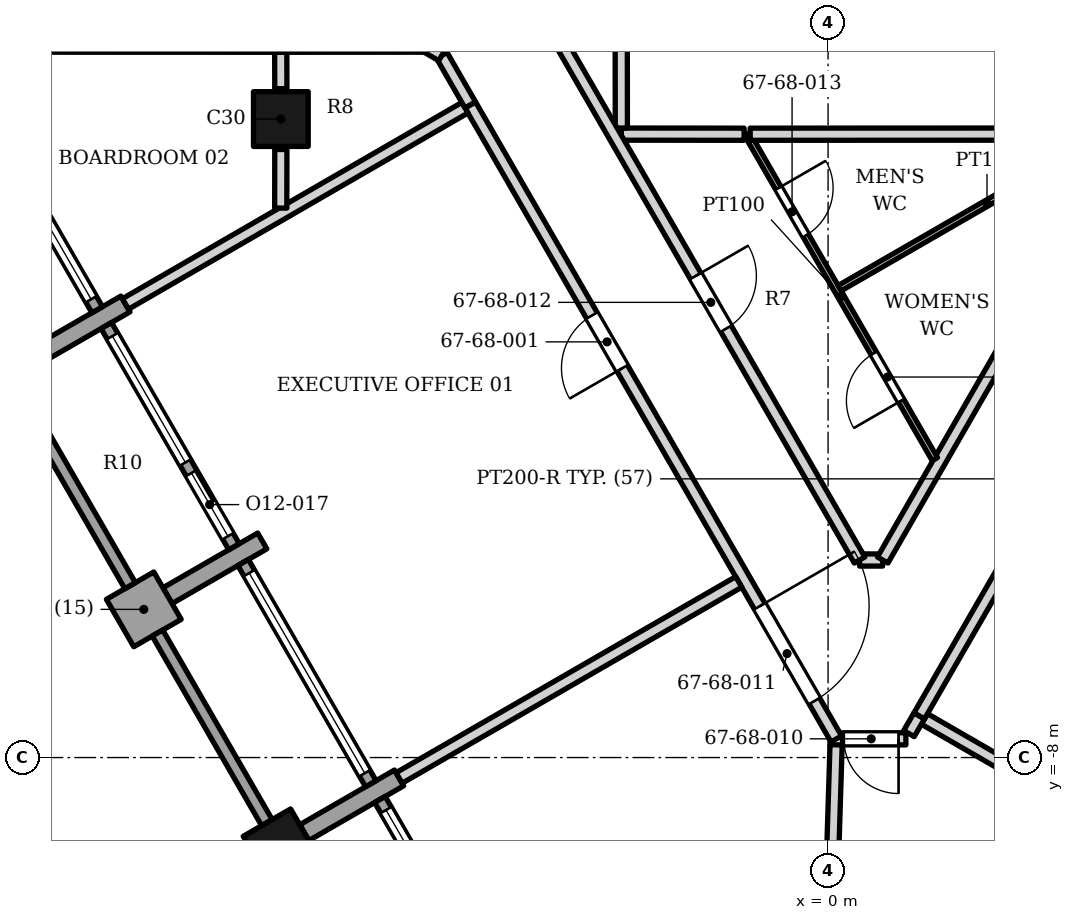
"""IFC4 building model, lengths in metres.
Left out: names, types, materials, properties, quantities, classifications, styles, units other than length and angle.
Written with IfcOpenShell. Run it as: python <this file> out.ifc"""

import sys

from ifc_helpers import new_model, si_unit, direction, frame, frame_2d, origin, origin_2d, place, context, subcontext, project, spatial, rectangle, extrude, element, fill, save


model = new_model("IFC4")
c1 = context("Model", 3, precision=1e-05, world=origin(), true_north=direction((0.0, 1.0)))
c2 = subcontext(c1, "Body", "Model", "MODEL_VIEW")
j1 = project(units=[si_unit("LENGTHUNIT", "METRE"), si_unit("PLANEANGLEUNIT", "RADIAN")], contexts=[c1])
p1 = place(None, origin())
s1 = spatial("IfcSite", under=j1, at=p1, CompositionType="ELEMENT")
p2 = place(p1, origin())
s2 = spatial("IfcBuilding", under=s1, at=p2, CompositionType="ELEMENT")
p3 = place(p2, frame((0.0, 0.0, 279.4)))
s3 = spatial("IfcBuildingStorey", under=s2, at=p3, CompositionType="ELEMENT", Elevation=279.4)
for number, where, z_axis, x_axis in (
    (1, (-9.0, 2.5, 0.0), (0.0, 0.0, 1.0), (1.0, 0.0, 0.0)),
    (2, (-9.004, -9.46, 0.0), (0.0, 0.0, 1.0), (0.5, -0.866, 0.0)),
):
    element("IfcColumn", number, at=place(p3, frame(where, z_axis=z_axis, x_axis=x_axis)), inside=s3, PredefinedType="COLUMN", context=c2, shape_type="SweptSolid", body=[
        extrude(rectangle(XDim=0.9, YDim=0.9, at=origin_2d()), origin(), (0.0, 0.0, 1.0), 3.9),
    ])
p4 = place(p3, frame((-11.555, -0.541, 0.0), z_axis=(0.0, 0.0, 1.0), x_axis=(-0.866047807691, -0.499961193289, 0.0)))
e3 = element("IfcWall", 3, at=p4, inside=s3, PredefinedType="SOLIDWALL", context=c2, shape_type="SweptSolid", body=[
    extrude(rectangle(XDim=1.8, YDim=0.3, at=frame_2d((0.9, 0.0))), origin(), (0.0, 0.0, 1.0), 3.0),
])
p5 = place(p3, frame((-11.479, -5.173, 0.0), z_axis=(0.0, 0.0, 1.0), x_axis=(0.499902469156, -0.866081705922, 0.0)))
e4 = element("IfcWall", 4, at=p5, inside=s3, PredefinedType="SOLIDWALL", context=c2, shape_type="SweptSolid", body=[
    extrude(rectangle(XDim=0.9, YDim=0.9, at=frame_2d((0.45, 0.0))), origin(), (0.0, 0.0, 1.0), 3.0),
])
for number, where, z_axis, x_axis in (
    (5, (-9.305, -4.438, 0.0), (0.0, 0.0, 1.0), (-0.866, -0.5, 0.0)),
    (6, (-8.614, -9.235, 0.0), (0.0, 0.0, 1.0), (0.866, 0.5, 0.0)),
):
    element("IfcWall", number, at=place(p3, frame(where, z_axis=z_axis, x_axis=x_axis)), inside=s3, PredefinedType="SOLIDWALL", context=c2, shape_type="SweptSolid", body=[
        extrude(rectangle(XDim=1.8, YDim=0.3, at=frame_2d((0.9, 0.0))), origin(), (0.0, 0.0, 1.0), 3.0),
    ])
p6 = place(p3, frame((-14.12, 3.001, 0.0), z_axis=(0.0, 0.0, 1.0), x_axis=(0.49998411664, -0.866034573852, 0.0)))
e7 = element("IfcWall", 7, at=p6, inside=s3, PredefinedType="ELEMENTEDWALL", context=c2, shape_type="SweptSolid", body=[
    extrude(rectangle(XDim=4.2, YDim=0.2, at=frame_2d((2.1, 0.0))), origin(), (0.0, 0.0, 1.0), 3.0),
])
p7 = place(p6, frame((0.2, 0.0, 0.45)))
e8 = element("IfcOpeningElement", 8, at=p7, cuts=e7, PredefinedType="OPENING", context=c2, shape_type="SweptSolid", body=[
    extrude(rectangle(XDim=3.8, YDim=2.25, at=frame_2d((1.9, 1.125))), frame((0.0, 0.11, 0.0), z_axis=(0.0, -1.0, 0.0), x_axis=(1.0, 0.0, 0.0)), (0.0, 0.0, 1.0), 0.22),
])
p8 = place(p3, frame((-13.279, -2.056, 0.0), z_axis=(0.0, 0.0, 1.0), x_axis=(0.500012057535, -0.866018442252, 0.0)))
e9 = element("IfcWall", 9, at=p8, inside=s3, PredefinedType="SOLIDWALL", context=c2, shape_type="SweptSolid", body=[
    extrude(rectangle(XDim=3.6, YDim=0.2, at=frame_2d((1.8, 0.0))), origin(), (0.0, 0.0, 1.0), 3.0),
])
p9 = place(p3, frame((-11.87, -0.896, 0.0), z_axis=(0.0, 0.0, 1.0), x_axis=(0.499958946799, -0.866049104564, 0.0)))
e10 = element("IfcWall", 10, at=p9, inside=s3, PredefinedType="ELEMENTEDWALL", context=c2, shape_type="SweptSolid", body=[
    extrude(rectangle(XDim=4.2, YDim=0.2, at=frame_2d((2.1, 0.0))), origin(), (0.0, 0.0, 1.0), 3.0),
])
p10 = place(p9, frame((0.2, 0.0, 0.45)))
e11 = element("IfcOpeningElement", 11, at=p10, cuts=e10, PredefinedType="OPENING", context=c2, shape_type="SweptSolid", body=[
    extrude(rectangle(XDim=2.4, YDim=2.25, at=frame_2d((1.2, 1.125))), frame((0.0, 0.11, 0.0), z_axis=(0.0, -1.0, 0.0), x_axis=(1.0, 0.0, 0.0)), (0.0, 0.0, 1.0), 0.22),
])
p11 = place(p9, frame((2.8, 0.0, 0.0)))
e12 = element("IfcOpeningElement", 12, at=p11, cuts=e10, PredefinedType="OPENING", context=c2, shape_type="SweptSolid", body=[
    extrude(rectangle(XDim=1.2, YDim=2.7, at=frame_2d((0.6, 1.35))), frame((0.0, 0.11, 0.0), z_axis=(0.0, -1.0, 0.0), x_axis=(1.0, 0.0, 0.0)), (0.0, 0.0, 1.0), 0.22),
])
p12 = place(p3, frame((-11.029, -5.953, 0.0), z_axis=(0.0, 0.0, 1.0), x_axis=(0.500012057535, -0.866018442252, 0.0)))
e13 = element("IfcWall", 13, at=p12, inside=s3, PredefinedType="SOLIDWALL", context=c2, shape_type="SweptSolid", body=[
    extrude(rectangle(XDim=3.6, YDim=0.2, at=frame_2d((1.8, 0.0))), origin(), (0.0, 0.0, 1.0), 3.0),
])
p13 = place(p3, frame((-9.62, -4.793, 0.0), z_axis=(0.0, 0.0, 1.0), x_axis=(0.49998411664, -0.866034573852, 0.0)))
e14 = element("IfcWall", 14, at=p13, inside=s3, PredefinedType="ELEMENTEDWALL", context=c2, shape_type="SweptSolid", body=[
    extrude(rectangle(XDim=4.2, YDim=0.2, at=frame_2d((2.1, 0.0))), origin(), (0.0, 0.0, 1.0), 3.0),
])
p14 = place(p13, frame((0.2, 0.0, 0.45)))
e15 = element("IfcOpeningElement", 15, at=p14, cuts=e14, PredefinedType="OPENING", context=c2, shape_type="SweptSolid", body=[
    extrude(rectangle(XDim=3.8, YDim=2.25, at=frame_2d((1.9, 1.125))), frame((0.0, 0.11, 0.0), z_axis=(0.0, -1.0, 0.0), x_axis=(1.0, 0.0, 0.0)), (0.0, 0.0, 1.0), 0.22),
])
p15 = place(p3, frame((-7.37, -8.69, 0.0), z_axis=(0.0, 0.0, 1.0), x_axis=(0.49998411664, -0.866034573852, 0.0)))
e16 = element("IfcWall", 16, at=p15, inside=s3, PredefinedType="ELEMENTEDWALL", context=c2, shape_type="SweptSolid", body=[
    extrude(rectangle(XDim=4.2, YDim=0.2, at=frame_2d((2.1, 0.0))), origin(), (0.0, 0.0, 1.0), 2.95),
])
p16 = place(p15, frame((0.2, 0.0, 0.45)))
e17 = element("IfcOpeningElement", 17, at=p16, cuts=e16, PredefinedType="OPENING", context=c2, shape_type="SweptSolid", body=[
    extrude(rectangle(XDim=2.4, YDim=2.25, at=frame_2d((1.2, 1.125))), frame((0.0, 0.11, 0.0), z_axis=(0.0, -1.0, 0.0), x_axis=(1.0, 0.0, 0.0)), (0.0, 0.0, 1.0), 0.22),
])
p17 = place(p15, frame((2.8, 0.0, 0.0)))
e18 = element("IfcOpeningElement", 18, at=p17, cuts=e16, PredefinedType="OPENING", context=c2, shape_type="SweptSolid", body=[
    extrude(rectangle(XDim=1.2, YDim=2.7, at=frame_2d((0.6, 1.35))), frame((0.0, 0.11, 0.0), z_axis=(0.0, -1.0, 0.0), x_axis=(1.0, 0.0, 0.0)), (0.0, 0.0, 1.0), 0.22),
])
p18 = place(p3, frame((0.016, -11.5, 0.0), z_axis=(0.0, 0.0, 1.0), x_axis=(0.031312793596, 0.999509634249, 0.0)))
e19 = element("IfcWall", 19, at=p18, inside=s3, PredefinedType="PARTITIONING", context=c2, shape_type="SweptSolid", body=[
    extrude(rectangle(XDim=3.711, YDim=0.2, at=frame_2d((1.855, 0.0))), origin(), (0.0, 0.0, 1.0), 2.884),
])
p19 = place(p3, frame((1.584, -7.365, 0.0), z_axis=(0.0, 0.0, 1.0), x_axis=(0.866145880339, -0.499791270404, 0.0)))
e20 = element("IfcWall", 20, at=p19, inside=s3, PredefinedType="PARTITIONING", context=c2, shape_type="SweptSolid", body=[
    extrude(rectangle(XDim=6.449, YDim=0.2, at=frame_2d((3.225, 0.0))), origin(), (0.0, 0.0, 1.0), 2.884),
])
p20 = place(p3, frame((-5.885, 2.733, 0.0), z_axis=(0.0, 0.0, 1.0), x_axis=(0.499999199346, -0.866025866042, 0.0)))
e21 = element("IfcWall", 21, at=p20, inside=s3, PredefinedType="PARTITIONING", context=c2, shape_type="SweptSolid", body=[
    extrude(rectangle(XDim=12.04, YDim=0.2, at=frame_2d((6.02, 0.0))), origin(), (0.0, 0.0, 1.0), 2.884),
])
p21 = place(p20, frame((4.0, 0.0, 0.0)))
e22 = element("IfcOpeningElement", 22, at=p21, cuts=e21, PredefinedType="OPENING", context=c2, shape_type="SweptSolid", body=[
    extrude(rectangle(XDim=1.0, YDim=2.4, at=frame_2d((0.5, 1.2))), frame((0.0, 0.11, 0.0), z_axis=(0.0, -1.0, 0.0), x_axis=(1.0, 0.0, 0.0)), (0.0, 0.0, 1.0), 0.22),
])
p22 = place(p20, frame((9.52, 0.0, 0.0)))
e23 = element("IfcOpeningElement", 23, at=p22, cuts=e21, PredefinedType="OPENING", context=c2, shape_type="SweptSolid", body=[
    extrude(rectangle(XDim=1.8, YDim=2.4, at=frame_2d((0.9, 1.2))), frame((0.0, 0.11, 0.0), z_axis=(0.0, -1.0, 0.0), x_axis=(1.0, 0.0, 0.0)), (0.0, 0.0, 1.0), 0.22),
])
p23 = place(p3, frame((0.236, -7.692, 0.0), z_axis=(0.0, 0.0, 1.0), x_axis=(1.0, 0.0, 0.0)))
e24 = element("IfcWall", 24, at=p23, inside=s3, PredefinedType="PARTITIONING", context=c2, shape_type="SweptSolid", body=[
    extrude(rectangle(XDim=1.043, YDim=0.2, at=frame_2d((0.522, 0.0))), origin(), (0.0, 0.0, 1.0), 3.73),
])
p24 = place(p23, frame((0.023, 0.0, 0.0)))
e25 = element("IfcOpeningElement", 25, at=p24, cuts=e24, PredefinedType="OPENING", context=c2, shape_type="SweptSolid", body=[
    extrude(rectangle(XDim=0.9, YDim=2.1, at=frame_2d((0.45, 1.05))), frame((0.0, 0.11, 0.0), z_axis=(0.0, -1.0, 0.0), x_axis=(1.0, 0.0, 0.0)), (0.0, 0.0, 1.0), 0.22),
])
p25 = place(p3, frame((1.33, -7.606, 0.0), z_axis=(0.0, 0.0, 1.0), x_axis=(0.503375579216, 0.86406772087, 0.0)))
e26 = element("IfcWall", 26, at=p25, inside=s3, PredefinedType="PARTITIONING", context=c2, shape_type="SweptSolid", body=[
    extrude(rectangle(XDim=0.337, YDim=0.2, at=frame_2d((0.168, 0.0))), origin(), (0.0, 0.0, 1.0), 3.73),
])
p26 = place(p3, frame((-7.055, -8.336, 0.0), z_axis=(0.0, 0.0, 1.0), x_axis=(0.866129493323, 0.499819668277, 0.0)))
e27 = element("IfcWall", 27, at=p26, inside=s3, PredefinedType="PARTITIONING", context=c2, shape_type="SweptSolid", body=[
    extrude(rectangle(XDim=6.45, YDim=0.2, at=frame_2d((3.225, 0.0))), origin(), (0.0, 0.0, 1.0), 2.884),
])
p27 = place(p3, frame((0.517, -4.751, 0.0), z_axis=(0.0, 0.0, 1.0), x_axis=(1.0, 0.0, 0.0)))
e28 = element("IfcWall", 28, at=p27, inside=s3, PredefinedType="PARTITIONING", context=c2, shape_type="SweptSolid", body=[
    extrude(rectangle(XDim=0.381, YDim=0.2, at=frame_2d((0.19, 0.0))), origin(), (0.0, 0.0, 1.0), 3.73),
])
p28 = place(p3, frame((0.898, -4.751, 0.0), z_axis=(0.0, 0.0, 1.0), x_axis=(0.499141293918, 0.866520610664, 0.0)))
e29 = element("IfcWall", 29, at=p28, inside=s3, PredefinedType="PARTITIONING", context=c2, shape_type="SweptSolid", body=[
    extrude(rectangle(XDim=8.451, YDim=0.2, at=frame_2d((4.226, 0.0))), origin(), (0.0, 0.0, 1.0), 2.884),
])
p29 = place(p3, frame((-11.556, -0.541, 0.0), z_axis=(0.0, 0.0, 1.0), x_axis=(0.865781982927, 0.500421380478, 0.0)))
e30 = element("IfcWall", 30, at=p29, inside=s3, PredefinedType="PARTITIONING", context=c2, shape_type="SweptSolid", body=[
    extrude(rectangle(XDim=6.45, YDim=0.2, at=frame_2d((3.225, 0.0))), origin(), (0.0, 0.0, 1.0), 3.202),
])
p30 = place(p3, frame((1.5, -7.314, 0.0), z_axis=(0.0, 0.0, 1.0), x_axis=(0.499990139034, 0.866031096941, 0.0)))
e31 = element("IfcWall", 31, at=p30, inside=s3, PredefinedType="PARTITIONING", context=c2, shape_type="SweptSolid", body=[
    extrude(rectangle(XDim=9.0, YDim=0.2, at=frame_2d((4.5, 0.0))), origin(), (0.0, 0.0, 1.0), 2.884),
])
p31 = place(p30, frame((4.0, 0.0, 0.0)))
e32 = element("IfcOpeningElement", 32, at=p31, cuts=e31, PredefinedType="OPENING", context=c2, shape_type="SweptSolid", body=[
    extrude(rectangle(XDim=1.0, YDim=2.1, at=frame_2d((0.5, 1.05))), frame((0.0, 0.11, 0.0), z_axis=(0.0, -1.0, 0.0), x_axis=(1.0, 0.0, 0.0)), (0.0, 0.0, 1.0), 0.22),
])
p32 = place(p3, frame((-9.002, 1.036, 0.0), z_axis=(0.0, 0.0, 1.0), x_axis=(0.001518985589, 0.999998846341, 0.0)))
e33 = element("IfcWall", 33, at=p32, inside=s3, PredefinedType="PARTITIONING", context=c2, shape_type="SweptSolid", body=[
    extrude(rectangle(XDim=0.964, YDim=0.2, at=frame_2d((0.482, 0.0))), origin(), (0.0, 0.0, 1.0), 3.202),
])
p33 = place(p3, frame((-3.4, 2.252, 0.0), z_axis=(0.0, 0.0, 1.0), x_axis=(0.999999531889, -0.00096758542, 0.0)))
e34 = element("IfcWall", 34, at=p33, inside=s3, PredefinedType="PARTITIONING", context=c2, shape_type="SweptSolid", body=[
    extrude(rectangle(XDim=2.019, YDim=0.2, at=frame_2d((1.009, 0.0))), origin(), (0.0, 0.0, 1.0), 3.73),
])
p34 = place(p3, frame((-1.33, 2.252, 0.0), z_axis=(0.0, 0.0, 1.0), x_axis=(0.499984964964, -0.866034084092, 0.0)))
e35 = element("IfcWall", 35, at=p34, inside=s3, PredefinedType="PARTITIONING", context=c2, shape_type="SweptSolid", body=[
    extrude(rectangle(XDim=6.172, YDim=0.1, at=frame_2d((3.086, 0.0))), origin(), (0.0, 0.0, 1.0), 2.884),
])
p35 = place(p34, frame((1.026, 0.0, 0.0)))
e36 = element("IfcOpeningElement", 36, at=p35, cuts=e35, PredefinedType="OPENING", context=c2, shape_type="SweptSolid", body=[
    extrude(rectangle(XDim=0.9, YDim=2.1, at=frame_2d((0.45, 1.05))), frame((0.0, 0.06, 0.0), z_axis=(0.0, -1.0, 0.0), x_axis=(1.0, 0.0, 0.0)), (0.0, 0.0, 1.0), 0.12),
])
p36 = place(p34, frame((4.163, 0.0, 0.0)))
e37 = element("IfcOpeningElement", 37, at=p36, cuts=e35, PredefinedType="OPENING", context=c2, shape_type="SweptSolid", body=[
    extrude(rectangle(XDim=0.9, YDim=2.1, at=frame_2d((0.45, 1.05))), frame((0.0, 0.06, 0.0), z_axis=(0.0, -1.0, 0.0), x_axis=(1.0, 0.0, 0.0)), (0.0, 0.0, 1.0), 0.12),
])
p37 = place(p3, frame((-1.281, 2.25, 0.0), z_axis=(0.0, 0.0, 1.0), x_axis=(0.999999912959, 0.000417231632, 0.0)))
e38 = element("IfcWall", 38, at=p37, inside=s3, PredefinedType="PARTITIONING", context=c2, shape_type="SweptSolid", body=[
    extrude(rectangle(XDim=4.681, YDim=0.2, at=frame_2d((2.341, 0.0))), origin(), (0.0, 0.0, 1.0), 3.73),
])
p38 = place(p3, frame((-3.402, 4.051, 0.0), z_axis=(0.0, 0.0, 1.0), x_axis=(0.001150085496, -0.999999338651, 0.0)))
e39 = element("IfcWall", 39, at=p38, inside=s3, PredefinedType="PARTITIONING", context=c2, shape_type="SweptSolid", body=[
    extrude(rectangle(XDim=1.698, YDim=0.2, at=frame_2d((0.849, 0.0))), origin(), (0.0, 0.0, 1.0), 3.73),
])
p39 = place(p3, frame((0.19, -0.281, 0.0), z_axis=(0.0, 0.0, 1.0), x_axis=(0.866035935605, 0.499981757907, 0.0)))
e40 = element("IfcWall", 40, at=p39, inside=s3, PredefinedType="PARTITIONING", context=c2, shape_type="SweptSolid", body=[
    extrude(rectangle(XDim=5.596, YDim=0.1, at=frame_2d((2.798, 0.0))), origin(), (0.0, 0.0, 1.0), 2.884),
])
p40 = place(p3, frame((-6.353, 3.546, 0.0), z_axis=(0.0, 0.0, 1.0), x_axis=(0.498715622975, -0.86676567041, 0.0)))
e41 = element("IfcWall", 41, at=p40, inside=s3, PredefinedType="PARTITIONING", context=c2, shape_type="SweptSolid", body=[
    extrude(rectangle(XDim=0.938, YDim=0.2, at=frame_2d((0.469, 0.0))), origin(), (0.0, 0.0, 1.0), 3.73),
])
p41 = place(p3, frame((-9.002, 3.6, 0.0), z_axis=(0.0, 0.0, 1.0), x_axis=(0.002442989453, -0.999997015897, 0.0)))
e42 = element("IfcWall", 42, at=p41, inside=s3, PredefinedType="PARTITIONING", context=c2, shape_type="SweptSolid", body=[
    extrude(rectangle(XDim=0.6, YDim=0.2, at=frame_2d((0.3, 0.0))), origin(), (0.0, 0.0, 1.0), 3.332),
])
p42 = place(p3, frame((-6.618, 3.699, 0.0), z_axis=(0.0, 0.0, 1.0), x_axis=(0.865826662844, -0.500344071524, 0.0)))
e43 = element("IfcWall", 43, at=p42, inside=s3, PredefinedType="PARTITIONING", context=c2, shape_type="SweptSolid", body=[
    extrude(rectangle(XDim=0.306, YDim=0.2, at=frame_2d((0.153, 0.0))), origin(), (0.0, 0.0, 1.0), 3.73),
])
p43 = place(p3, frame((-13.277, 3.7, 0.0), z_axis=(0.0, 0.0, 1.0), x_axis=(0.999999920155, -0.000399611774, 0.0)))
e44 = element("IfcWall", 44, at=p43, inside=s3, PredefinedType="PARTITIONING", context=c2, shape_type="SweptSolid", body=[
    extrude(rectangle(XDim=4.277, YDim=0.2, at=frame_2d((2.138, 0.0))), origin(), (0.0, 0.0, 1.0), 3.73),
])
p44 = place(p3, frame((-9.0, 3.698, 0.0), z_axis=(0.0, 0.0, 1.0), x_axis=(0.999999810961, 0.000614879982, 0.0)))
e45 = element("IfcWall", 45, at=p44, inside=s3, PredefinedType="PARTITIONING", context=c2, shape_type="SweptSolid", body=[
    extrude(rectangle(XDim=2.382, YDim=0.2, at=frame_2d((1.191, 0.0))), origin(), (0.0, 0.0, 1.0), 3.73),
])
p45 = place(p44, frame((0.59, 0.0, 0.0)))
e46 = element("IfcOpeningElement", 46, at=p45, cuts=e45, PredefinedType="OPENING", context=c2, shape_type="SweptSolid", body=[
    extrude(rectangle(XDim=1.2, YDim=2.4, at=frame_2d((0.6, 1.2))), frame((0.0, 0.11, 0.0), z_axis=(0.0, -1.0, 0.0), x_axis=(1.0, 0.0, 0.0)), (0.0, 0.0, 1.0), 0.22),
])
p46 = place(p3, frame((-4.375, 3.723, 0.0), z_axis=(0.0, 0.0, 1.0), x_axis=(0.499984508542, -0.866034347597, 0.0)))
e47 = element("IfcWall", 47, at=p46, inside=s3, PredefinedType="PARTITIONING", context=c2, shape_type="SweptSolid", body=[
    extrude(rectangle(XDim=9.785, YDim=0.2, at=frame_2d((4.893, 0.0))), origin(), (0.0, 0.0, 1.0), 2.884),
])
p47 = place(p46, frame((4.393, 0.0, 0.0)))
e48 = element("IfcOpeningElement", 48, at=p47, cuts=e47, PredefinedType="OPENING", context=c2, shape_type="SweptSolid", body=[
    extrude(rectangle(XDim=1.0, YDim=2.1, at=frame_2d((0.5, 1.05))), frame((0.0, 0.11, 0.0), z_axis=(0.0, -1.0, 0.0), x_axis=(1.0, 0.0, 0.0)), (0.0, 0.0, 1.0), 0.22),
])
p48 = place(p7, origin())
e49 = element("IfcWindow", 49, at=p48, inside=s3, PartitioningType="SINGLE_PANEL", PredefinedType="WINDOW", context=c2, shape_type="SweptSolid", body=[
    extrude(rectangle(XDim=3.8, YDim=2.25, at=frame_2d((1.9, 1.125))), frame((0.0, 0.03, 0.0), z_axis=(0.0, -1.0, 0.0), x_axis=(1.0, 0.0, 0.0)), (0.0, 0.0, 1.0), 0.06),
])
fill(e8, e49)
p49 = place(p10, origin())
e50 = element("IfcWindow", 50, at=p49, inside=s3, PartitioningType="SINGLE_PANEL", PredefinedType="WINDOW", context=c2, shape_type="SweptSolid", body=[
    extrude(rectangle(XDim=2.4, YDim=2.25, at=frame_2d((1.2, 1.125))), frame((0.0, 0.03, 0.0), z_axis=(0.0, -1.0, 0.0), x_axis=(1.0, 0.0, 0.0)), (0.0, 0.0, 1.0), 0.06),
])
fill(e11, e50)
p50 = place(p11, origin())
e51 = element("IfcDoor", 51, at=p50, inside=s3, OperationType="SINGLE_SWING_LEFT", PredefinedType="DOOR", context=c2, shape_type="SweptSolid", body=[
    extrude(rectangle(XDim=1.2, YDim=2.7, at=frame_2d((0.6, 1.35))), frame((0.0, 0.025, 0.0), z_axis=(0.0, -1.0, 0.0), x_axis=(1.0, 0.0, 0.0)), (0.0, 0.0, 1.0), 0.05),
])
fill(e12, e51)
p51 = place(p14, origin())
e52 = element("IfcWindow", 52, at=p51, inside=s3, PartitioningType="SINGLE_PANEL", PredefinedType="WINDOW", context=c2, shape_type="SweptSolid", body=[
    extrude(rectangle(XDim=3.8, YDim=2.25, at=frame_2d((1.9, 1.125))), frame((0.0, 0.03, 0.0), z_axis=(0.0, -1.0, 0.0), x_axis=(1.0, 0.0, 0.0)), (0.0, 0.0, 1.0), 0.06),
])
fill(e15, e52)
p52 = place(p16, origin())
e53 = element("IfcWindow", 53, at=p52, inside=s3, PartitioningType="SINGLE_PANEL", PredefinedType="WINDOW", context=c2, shape_type="SweptSolid", body=[
    extrude(rectangle(XDim=2.4, YDim=2.25, at=frame_2d((1.2, 1.125))), frame((0.0, 0.03, 0.0), z_axis=(0.0, -1.0, 0.0), x_axis=(1.0, 0.0, 0.0)), (0.0, 0.0, 1.0), 0.06),
])
fill(e17, e53)
p53 = place(p21, origin())
e54 = element("IfcDoor", 54, at=p53, inside=s3, OperationType="SINGLE_SWING_RIGHT", PredefinedType="DOOR", context=c2, shape_type="SweptSolid", body=[
    extrude(rectangle(XDim=1.0, YDim=2.4, at=frame_2d((0.5, 1.2))), frame((0.0, 0.025, 0.0), z_axis=(0.0, -1.0, 0.0), x_axis=(1.0, 0.0, 0.0)), (0.0, 0.0, 1.0), 0.05),
])
fill(e22, e54)
p54 = place(p24, origin())
e55 = element("IfcDoor", 55, at=p54, inside=s3, OperationType="SINGLE_SWING_RIGHT", PredefinedType="DOOR", context=c2, shape_type="SweptSolid", body=[
    extrude(rectangle(XDim=0.9, YDim=2.1, at=frame_2d((0.45, 1.05))), frame((0.0, 0.025, 0.0), z_axis=(0.0, -1.0, 0.0), x_axis=(1.0, 0.0, 0.0)), (0.0, 0.0, 1.0), 0.05),
])
fill(e25, e55)
p55 = place(p22, origin())
e56 = element("IfcDoor", 56, at=p55, inside=s3, OperationType="DOUBLE_DOOR_SINGLE_SWING", PredefinedType="DOOR", context=c2, shape_type="SweptSolid", body=[
    extrude(rectangle(XDim=1.8, YDim=2.4, at=frame_2d((0.9, 1.2))), frame((0.0, 0.025, 0.0), z_axis=(0.0, -1.0, 0.0), x_axis=(1.0, 0.0, 0.0)), (0.0, 0.0, 1.0), 0.05),
])
fill(e23, e56)
p56 = place(p47, origin())
e57 = element("IfcDoor", 57, at=p56, inside=s3, OperationType="SINGLE_SWING_LEFT", PredefinedType="DOOR", context=c2, shape_type="SweptSolid", body=[
    extrude(rectangle(XDim=1.0, YDim=2.1, at=frame_2d((0.5, 1.05))), frame((0.0, 0.025, 0.0), z_axis=(0.0, -1.0, 0.0), x_axis=(1.0, 0.0, 0.0)), (0.0, 0.0, 1.0), 0.05),
])
fill(e48, e57)
p57 = place(p35, origin())
e58 = element("IfcDoor", 58, at=p57, inside=s3, OperationType="SINGLE_SWING_LEFT", PredefinedType="DOOR", context=c2, shape_type="SweptSolid", body=[
    extrude(rectangle(XDim=0.9, YDim=2.1, at=frame_2d((0.45, 1.05))), frame((0.0, 0.025, 0.0), z_axis=(0.0, -1.0, 0.0), x_axis=(1.0, 0.0, 0.0)), (0.0, 0.0, 1.0), 0.05),
])
fill(e36, e58)
p58 = place(p36, origin())
e59 = element("IfcDoor", 59, at=p58, inside=s3, OperationType="SINGLE_SWING_RIGHT", PredefinedType="DOOR", context=c2, shape_type="SweptSolid", body=[
    extrude(rectangle(XDim=0.9, YDim=2.1, at=frame_2d((0.45, 1.05))), frame((0.0, 0.025, 0.0), z_axis=(0.0, -1.0, 0.0), x_axis=(1.0, 0.0, 0.0)), (0.0, 0.0, 1.0), 0.05),
])
fill(e37, e59)
save(model, sys.argv[1])
